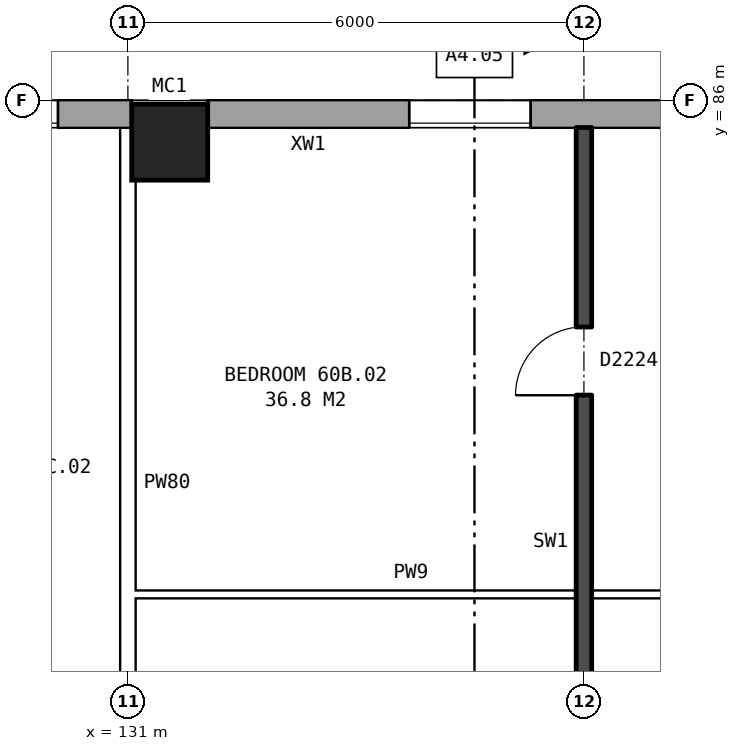
"""IFC4 building model, lengths in metres.
Left out: names, types, materials, properties, quantities, classifications, styles, units other than length and angle.
Written with IfcOpenShell. Run it as: python <this file> out.ifc"""

import sys

from ifc_helpers import new_model, si_unit, direction, frame, frame_2d, origin, origin_2d, place, context, subcontext, project, spatial, rectangle, hollow_rectangle, extrude, element, fill, save


model = new_model("IFC4")
c1 = context("Model", 3, precision=1e-05, world=origin(), true_north=direction((0.0, 1.0)))
c2 = subcontext(c1, "Body", "Model", "MODEL_VIEW")
j1 = project(units=[si_unit("LENGTHUNIT", "METRE"), si_unit("PLANEANGLEUNIT", "RADIAN")], contexts=[c1])
p1 = place(None, origin())
s1 = spatial("IfcSite", under=j1, at=p1, CompositionType="ELEMENT")
p2 = place(p1, origin())
s2 = spatial("IfcBuilding", under=s1, at=p2, CompositionType="ELEMENT")
p3 = place(p2, frame((0.0, 0.0, 212.1)))
s3 = spatial("IfcBuildingStorey", under=s2, at=p3, CompositionType="ELEMENT", Elevation=212.1)
p4 = place(p3, frame((131.55, 85.45, 0.0), z_axis=(0.0, 0.0, 1.0), x_axis=(1.0, 0.0, 0.0)))
e1 = element("IfcColumn", 1, at=p4, inside=s3, PredefinedType="COLUMN", context=c2, shape_type="SweptSolid", body=[
    extrude(hollow_rectangle(XDim=1.0, YDim=1.0, WallThickness=0.055, at=origin_2d()), origin(), (0.0, 0.0, 1.0), 3.1),
])
p5 = place(p3, frame((165.925, 85.82, 0.0), z_axis=(0.0, 0.0, 1.0), x_axis=(-1.0, 0.0, 0.0)))
e2 = element("IfcWall", 2, at=p5, inside=s3, PredefinedType="STANDARD", context=c2, shape_type="SweptSolid", body=[
    extrude(rectangle(XDim=33.875, YDim=0.36, at=frame_2d((16.938, 0.0))), origin(), (0.0, 0.0, 1.0), 2.85),
])
p6 = place(p5, frame((0.3, 0.0, 0.8)))
e3 = element("IfcOpeningElement", 3, at=p6, cuts=e2, PredefinedType="OPENING", context=c2, shape_type="SweptSolid", body=[
    extrude(rectangle(XDim=0.6, YDim=1.8, at=frame_2d((0.3, 0.9))), frame((0.0, 0.19, 0.0), z_axis=(0.0, -1.0, 0.0), x_axis=(1.0, 0.0, 0.0)), (0.0, 0.0, 1.0), 0.38),
])
p7 = place(p5, frame((5.625, 0.0, 0.8)))
e4 = element("IfcOpeningElement", 4, at=p7, cuts=e2, PredefinedType="OPENING", context=c2, shape_type="SweptSolid", body=[
    extrude(rectangle(XDim=1.6, YDim=1.8, at=frame_2d((0.8, 0.9))), frame((0.0, 0.19, 0.0), z_axis=(0.0, -1.0, 0.0), x_axis=(1.0, 0.0, 0.0)), (0.0, 0.0, 1.0), 0.38),
])
p8 = place(p5, frame((8.625, 0.0, 0.8)))
e5 = element("IfcOpeningElement", 5, at=p8, cuts=e2, PredefinedType="OPENING", context=c2, shape_type="SweptSolid", body=[
    extrude(rectangle(XDim=1.6, YDim=1.8, at=frame_2d((0.8, 0.9))), frame((0.0, 0.19, 0.0), z_axis=(0.0, -1.0, 0.0), x_axis=(1.0, 0.0, 0.0)), (0.0, 0.0, 1.0), 0.38),
])
p9 = place(p5, frame((11.625, 0.0, 0.8)))
e6 = element("IfcOpeningElement", 6, at=p9, cuts=e2, PredefinedType="OPENING", context=c2, shape_type="SweptSolid", body=[
    extrude(rectangle(XDim=1.6, YDim=1.8, at=frame_2d((0.8, 0.9))), frame((0.0, 0.19, 0.0), z_axis=(0.0, -1.0, 0.0), x_axis=(1.0, 0.0, 0.0)), (0.0, 0.0, 1.0), 0.38),
])
p10 = place(p5, frame((14.625, 0.0, 0.8)))
e7 = element("IfcOpeningElement", 7, at=p10, cuts=e2, PredefinedType="OPENING", context=c2, shape_type="SweptSolid", body=[
    extrude(rectangle(XDim=1.6, YDim=1.8, at=frame_2d((0.8, 0.9))), frame((0.0, 0.19, 0.0), z_axis=(0.0, -1.0, 0.0), x_axis=(1.0, 0.0, 0.0)), (0.0, 0.0, 1.0), 0.38),
])
p11 = place(p5, frame((17.625, 0.0, 0.8)))
e8 = element("IfcOpeningElement", 8, at=p11, cuts=e2, PredefinedType="OPENING", context=c2, shape_type="SweptSolid", body=[
    extrude(rectangle(XDim=1.6, YDim=1.8, at=frame_2d((0.8, 0.9))), frame((0.0, 0.19, 0.0), z_axis=(0.0, -1.0, 0.0), x_axis=(1.0, 0.0, 0.0)), (0.0, 0.0, 1.0), 0.38),
])
p12 = place(p5, frame((20.625, 0.0, 0.8)))
e9 = element("IfcOpeningElement", 9, at=p12, cuts=e2, PredefinedType="OPENING", context=c2, shape_type="SweptSolid", body=[
    extrude(rectangle(XDim=1.6, YDim=1.8, at=frame_2d((0.8, 0.9))), frame((0.0, 0.19, 0.0), z_axis=(0.0, -1.0, 0.0), x_axis=(1.0, 0.0, 0.0)), (0.0, 0.0, 1.0), 0.38),
])
p13 = place(p5, frame((23.625, 0.0, 0.8)))
e10 = element("IfcOpeningElement", 10, at=p13, cuts=e2, PredefinedType="OPENING", context=c2, shape_type="SweptSolid", body=[
    extrude(rectangle(XDim=1.6, YDim=1.8, at=frame_2d((0.8, 0.9))), frame((0.0, 0.19, 0.0), z_axis=(0.0, -1.0, 0.0), x_axis=(1.0, 0.0, 0.0)), (0.0, 0.0, 1.0), 0.38),
])
p14 = place(p5, frame((25.525, 0.0, 0.8)))
e11 = element("IfcOpeningElement", 11, at=p14, cuts=e2, PredefinedType="OPENING", context=c2, shape_type="SweptSolid", body=[
    extrude(rectangle(XDim=1.6, YDim=1.8, at=frame_2d((0.8, 0.9))), frame((0.0, 0.19, 0.0), z_axis=(0.0, -1.0, 0.0), x_axis=(1.0, 0.0, 0.0)), (0.0, 0.0, 1.0), 0.38),
])
p15 = place(p5, frame((29.625, 0.0, 0.8)))
e12 = element("IfcOpeningElement", 12, at=p15, cuts=e2, PredefinedType="OPENING", context=c2, shape_type="SweptSolid", body=[
    extrude(rectangle(XDim=1.6, YDim=1.8, at=frame_2d((0.8, 0.9))), frame((0.0, 0.19, 0.0), z_axis=(0.0, -1.0, 0.0), x_axis=(1.0, 0.0, 0.0)), (0.0, 0.0, 1.0), 0.38),
])
p16 = place(p5, frame((1.2, 0.0, 1.1)))
e13 = element("IfcOpeningElement", 13, at=p16, cuts=e2, PredefinedType="OPENING", context=c2, shape_type="SweptSolid", body=[
    extrude(rectangle(XDim=1.4, YDim=1.5, at=frame_2d((0.7, 0.75))), frame((0.0, 0.19, 0.0), z_axis=(0.0, -1.0, 0.0), x_axis=(1.0, 0.0, 0.0)), (0.0, 0.0, 1.0), 0.38),
])
p17 = place(p5, frame((4.05, 0.0, 0.8)))
e14 = element("IfcOpeningElement", 14, at=p17, cuts=e2, PredefinedType="OPENING", context=c2, shape_type="SweptSolid", body=[
    extrude(rectangle(XDim=0.6, YDim=0.9, at=frame_2d((0.3, 0.45))), frame((0.0, 0.19, 0.0), z_axis=(0.0, -1.0, 0.0), x_axis=(1.0, 0.0, 0.0)), (0.0, 0.0, 1.0), 0.38),
])
p18 = place(p3, frame((131.05, 85.82, 0.0), z_axis=(0.0, 0.0, 1.0), x_axis=(-1.0, 0.0, 0.0)))
e15 = element("IfcWall", 15, at=p18, inside=s3, PredefinedType="STANDARD", context=c2, shape_type="SweptSolid", body=[
    extrude(rectangle(XDim=55.1, YDim=0.36, at=frame_2d((27.55, 0.0))), origin(), (0.0, 0.0, 1.0), 2.85),
])
p19 = place(p18, frame((0.969, 0.0, 0.8)))
e16 = element("IfcOpeningElement", 16, at=p19, cuts=e15, PredefinedType="OPENING", context=c2, shape_type="SweptSolid", body=[
    extrude(rectangle(XDim=1.6, YDim=1.8, at=frame_2d((0.8, 0.9))), frame((0.0, 0.19, 0.0), z_axis=(0.0, -1.0, 0.0), x_axis=(1.0, 0.0, 0.0)), (0.0, 0.0, 1.0), 0.38),
])
p20 = place(p18, frame((4.406, 0.0, 0.8)))
e17 = element("IfcOpeningElement", 17, at=p20, cuts=e15, PredefinedType="OPENING", context=c2, shape_type="SweptSolid", body=[
    extrude(rectangle(XDim=1.6, YDim=1.8, at=frame_2d((0.8, 0.9))), frame((0.0, 0.19, 0.0), z_axis=(0.0, -1.0, 0.0), x_axis=(1.0, 0.0, 0.0)), (0.0, 0.0, 1.0), 0.38),
])
p21 = place(p18, frame((7.844, 0.0, 0.8)))
e18 = element("IfcOpeningElement", 18, at=p21, cuts=e15, PredefinedType="OPENING", context=c2, shape_type="SweptSolid", body=[
    extrude(rectangle(XDim=1.6, YDim=1.8, at=frame_2d((0.8, 0.9))), frame((0.0, 0.19, 0.0), z_axis=(0.0, -1.0, 0.0), x_axis=(1.0, 0.0, 0.0)), (0.0, 0.0, 1.0), 0.38),
])
p22 = place(p18, frame((11.281, 0.0, 0.8)))
e19 = element("IfcOpeningElement", 19, at=p22, cuts=e15, PredefinedType="OPENING", context=c2, shape_type="SweptSolid", body=[
    extrude(rectangle(XDim=1.6, YDim=1.8, at=frame_2d((0.8, 0.9))), frame((0.0, 0.19, 0.0), z_axis=(0.0, -1.0, 0.0), x_axis=(1.0, 0.0, 0.0)), (0.0, 0.0, 1.0), 0.38),
])
p23 = place(p18, frame((14.719, 0.0, 0.8)))
e20 = element("IfcOpeningElement", 20, at=p23, cuts=e15, PredefinedType="OPENING", context=c2, shape_type="SweptSolid", body=[
    extrude(rectangle(XDim=1.6, YDim=1.8, at=frame_2d((0.8, 0.9))), frame((0.0, 0.19, 0.0), z_axis=(0.0, -1.0, 0.0), x_axis=(1.0, 0.0, 0.0)), (0.0, 0.0, 1.0), 0.38),
])
p24 = place(p18, frame((18.156, 0.0, 0.8)))
e21 = element("IfcOpeningElement", 21, at=p24, cuts=e15, PredefinedType="OPENING", context=c2, shape_type="SweptSolid", body=[
    extrude(rectangle(XDim=1.6, YDim=1.8, at=frame_2d((0.8, 0.9))), frame((0.0, 0.19, 0.0), z_axis=(0.0, -1.0, 0.0), x_axis=(1.0, 0.0, 0.0)), (0.0, 0.0, 1.0), 0.38),
])
p25 = place(p18, frame((21.594, 0.0, 0.8)))
e22 = element("IfcOpeningElement", 22, at=p25, cuts=e15, PredefinedType="OPENING", context=c2, shape_type="SweptSolid", body=[
    extrude(rectangle(XDim=1.6, YDim=1.8, at=frame_2d((0.8, 0.9))), frame((0.0, 0.19, 0.0), z_axis=(0.0, -1.0, 0.0), x_axis=(1.0, 0.0, 0.0)), (0.0, 0.0, 1.0), 0.38),
])
p26 = place(p18, frame((25.031, 0.0, 0.8)))
e23 = element("IfcOpeningElement", 23, at=p26, cuts=e15, PredefinedType="OPENING", context=c2, shape_type="SweptSolid", body=[
    extrude(rectangle(XDim=1.6, YDim=1.8, at=frame_2d((0.8, 0.9))), frame((0.0, 0.19, 0.0), z_axis=(0.0, -1.0, 0.0), x_axis=(1.0, 0.0, 0.0)), (0.0, 0.0, 1.0), 0.38),
])
p27 = place(p18, frame((28.469, 0.0, 0.8)))
e24 = element("IfcOpeningElement", 24, at=p27, cuts=e15, PredefinedType="OPENING", context=c2, shape_type="SweptSolid", body=[
    extrude(rectangle(XDim=1.6, YDim=1.8, at=frame_2d((0.8, 0.9))), frame((0.0, 0.19, 0.0), z_axis=(0.0, -1.0, 0.0), x_axis=(1.0, 0.0, 0.0)), (0.0, 0.0, 1.0), 0.38),
])
p28 = place(p18, frame((31.906, 0.0, 0.8)))
e25 = element("IfcOpeningElement", 25, at=p28, cuts=e15, PredefinedType="OPENING", context=c2, shape_type="SweptSolid", body=[
    extrude(rectangle(XDim=1.6, YDim=1.8, at=frame_2d((0.8, 0.9))), frame((0.0, 0.19, 0.0), z_axis=(0.0, -1.0, 0.0), x_axis=(1.0, 0.0, 0.0)), (0.0, 0.0, 1.0), 0.38),
])
p29 = place(p18, frame((35.344, 0.0, 0.8)))
e26 = element("IfcOpeningElement", 26, at=p29, cuts=e15, PredefinedType="OPENING", context=c2, shape_type="SweptSolid", body=[
    extrude(rectangle(XDim=1.6, YDim=1.8, at=frame_2d((0.8, 0.9))), frame((0.0, 0.19, 0.0), z_axis=(0.0, -1.0, 0.0), x_axis=(1.0, 0.0, 0.0)), (0.0, 0.0, 1.0), 0.38),
])
p30 = place(p18, frame((38.781, 0.0, 0.8)))
e27 = element("IfcOpeningElement", 27, at=p30, cuts=e15, PredefinedType="OPENING", context=c2, shape_type="SweptSolid", body=[
    extrude(rectangle(XDim=1.6, YDim=1.8, at=frame_2d((0.8, 0.9))), frame((0.0, 0.19, 0.0), z_axis=(0.0, -1.0, 0.0), x_axis=(1.0, 0.0, 0.0)), (0.0, 0.0, 1.0), 0.38),
])
p31 = place(p18, frame((42.219, 0.0, 0.8)))
e28 = element("IfcOpeningElement", 28, at=p31, cuts=e15, PredefinedType="OPENING", context=c2, shape_type="SweptSolid", body=[
    extrude(rectangle(XDim=1.6, YDim=1.8, at=frame_2d((0.8, 0.9))), frame((0.0, 0.19, 0.0), z_axis=(0.0, -1.0, 0.0), x_axis=(1.0, 0.0, 0.0)), (0.0, 0.0, 1.0), 0.38),
])
p32 = place(p18, frame((45.656, 0.0, 0.8)))
e29 = element("IfcOpeningElement", 29, at=p32, cuts=e15, PredefinedType="OPENING", context=c2, shape_type="SweptSolid", body=[
    extrude(rectangle(XDim=1.6, YDim=1.8, at=frame_2d((0.8, 0.9))), frame((0.0, 0.19, 0.0), z_axis=(0.0, -1.0, 0.0), x_axis=(1.0, 0.0, 0.0)), (0.0, 0.0, 1.0), 0.38),
])
p33 = place(p18, frame((49.094, 0.0, 0.8)))
e30 = element("IfcOpeningElement", 30, at=p33, cuts=e15, PredefinedType="OPENING", context=c2, shape_type="SweptSolid", body=[
    extrude(rectangle(XDim=1.6, YDim=1.8, at=frame_2d((0.8, 0.9))), frame((0.0, 0.19, 0.0), z_axis=(0.0, -1.0, 0.0), x_axis=(1.0, 0.0, 0.0)), (0.0, 0.0, 1.0), 0.38),
])
p34 = place(p18, frame((52.531, 0.0, 0.8)))
e31 = element("IfcOpeningElement", 31, at=p34, cuts=e15, PredefinedType="OPENING", context=c2, shape_type="SweptSolid", body=[
    extrude(rectangle(XDim=1.6, YDim=1.8, at=frame_2d((0.8, 0.9))), frame((0.0, 0.19, 0.0), z_axis=(0.0, -1.0, 0.0), x_axis=(1.0, 0.0, 0.0)), (0.0, 0.0, 1.0), 0.38),
])
p35 = place(p3, frame((131.1, 79.5, 0.0), z_axis=(0.0, 0.0, 1.0), x_axis=(1.0, 0.0, 0.0)))
e32 = element("IfcWall", 32, at=p35, inside=s3, PredefinedType="PARTITIONING", context=c2, shape_type="SweptSolid", body=[
    extrude(rectangle(XDim=11.8, YDim=0.1, at=frame_2d((5.9, 0.0))), origin(), (0.0, 0.0, 1.0), 2.85),
])
p36 = place(p35, frame((7.25, 0.0, 0.0)))
e33 = element("IfcOpeningElement", 33, at=p36, cuts=e32, PredefinedType="OPENING", context=c2, shape_type="SweptSolid", body=[
    extrude(rectangle(XDim=0.9, YDim=2.1, at=frame_2d((0.45, 1.05))), frame((0.0, 0.06, 0.0), z_axis=(0.0, -1.0, 0.0), x_axis=(1.0, 0.0, 0.0)), (0.0, 0.0, 1.0), 0.12),
])
p37 = place(p35, frame((10.2, 0.0, 0.0)))
e34 = element("IfcOpeningElement", 34, at=p37, cuts=e32, PredefinedType="OPENING", context=c2, shape_type="SweptSolid", body=[
    extrude(rectangle(XDim=0.9, YDim=2.1, at=frame_2d((0.45, 1.05))), frame((0.0, 0.06, 0.0), z_axis=(0.0, -1.0, 0.0), x_axis=(1.0, 0.0, 0.0)), (0.0, 0.0, 1.0), 0.12),
])
p38 = place(p3, frame((131.0, 76.3, 0.0), z_axis=(0.0, 0.0, 1.0), x_axis=(0.0, 1.0, 0.0)))
e35 = element("IfcWall", 35, at=p38, inside=s3, PredefinedType="PARTITIONING", context=c2, shape_type="SweptSolid", body=[
    extrude(rectangle(XDim=9.34, YDim=0.2, at=frame_2d((4.67, 0.0))), origin(), (0.0, 0.0, 1.0), 2.85),
])
p39 = place(p3, frame((137.0, 76.2, 0.0), z_axis=(0.0, 0.0, 1.0), x_axis=(0.0, 1.0, 0.0)))
e36 = element("IfcWall", 36, at=p39, inside=s3, PredefinedType="SOLIDWALL", context=c2, shape_type="SweptSolid", body=[
    extrude(rectangle(XDim=9.44, YDim=0.2, at=frame_2d((4.72, 0.0))), origin(), (0.0, 0.0, 1.0), 2.85),
])
p40 = place(p39, frame((5.92, 0.0, 0.0)))
e37 = element("IfcOpeningElement", 37, at=p40, cuts=e36, PredefinedType="OPENING", context=c2, shape_type="SweptSolid", body=[
    extrude(rectangle(XDim=0.9, YDim=2.1, at=frame_2d((0.45, 1.05))), frame((0.0, 0.11, 0.0), z_axis=(0.0, -1.0, 0.0), x_axis=(1.0, 0.0, 0.0)), (0.0, 0.0, 1.0), 0.22),
])
p41 = place(p39, frame((1.25, 0.0, 0.0)))
e38 = element("IfcOpeningElement", 38, at=p41, cuts=e36, PredefinedType="OPENING", context=c2, shape_type="SweptSolid", body=[
    extrude(rectangle(XDim=0.8, YDim=2.1, at=frame_2d((0.4, 1.05))), frame((0.0, 0.11, 0.0), z_axis=(0.0, -1.0, 0.0), x_axis=(1.0, 0.0, 0.0)), (0.0, 0.0, 1.0), 0.22),
])
p42 = place(p15, origin())
e39 = element("IfcWindow", 39, at=p42, inside=s3, PartitioningType="SINGLE_PANEL", PredefinedType="WINDOW", context=c2, shape_type="SweptSolid", body=[
    extrude(rectangle(XDim=1.6, YDim=1.8, at=frame_2d((0.8, 0.9))), frame((0.0, 0.15, 0.0), z_axis=(0.0, -1.0, 0.0), x_axis=(1.0, 0.0, 0.0)), (0.0, 0.0, 1.0), 0.06),
])
fill(e12, e39)
p43 = place(p19, origin())
e40 = element("IfcWindow", 40, at=p43, inside=s3, PartitioningType="SINGLE_PANEL", PredefinedType="WINDOW", context=c2, shape_type="SweptSolid", body=[
    extrude(rectangle(XDim=1.6, YDim=1.8, at=frame_2d((0.8, 0.9))), frame((0.0, 0.15, 0.0), z_axis=(0.0, -1.0, 0.0), x_axis=(1.0, 0.0, 0.0)), (0.0, 0.0, 1.0), 0.06),
])
fill(e16, e40)
p44 = place(p40, origin())
e41 = element("IfcDoor", 41, at=p44, inside=s3, OperationType="SINGLE_SWING_LEFT", PredefinedType="DOOR", context=c2, shape_type="SweptSolid", body=[
    extrude(rectangle(XDim=0.9, YDim=2.1, at=frame_2d((0.45, 1.05))), frame((0.0, 0.025, 0.0), z_axis=(0.0, -1.0, 0.0), x_axis=(1.0, 0.0, 0.0)), (0.0, 0.0, 1.0), 0.05),
])
fill(e37, e41)
save(model, sys.argv[1])
